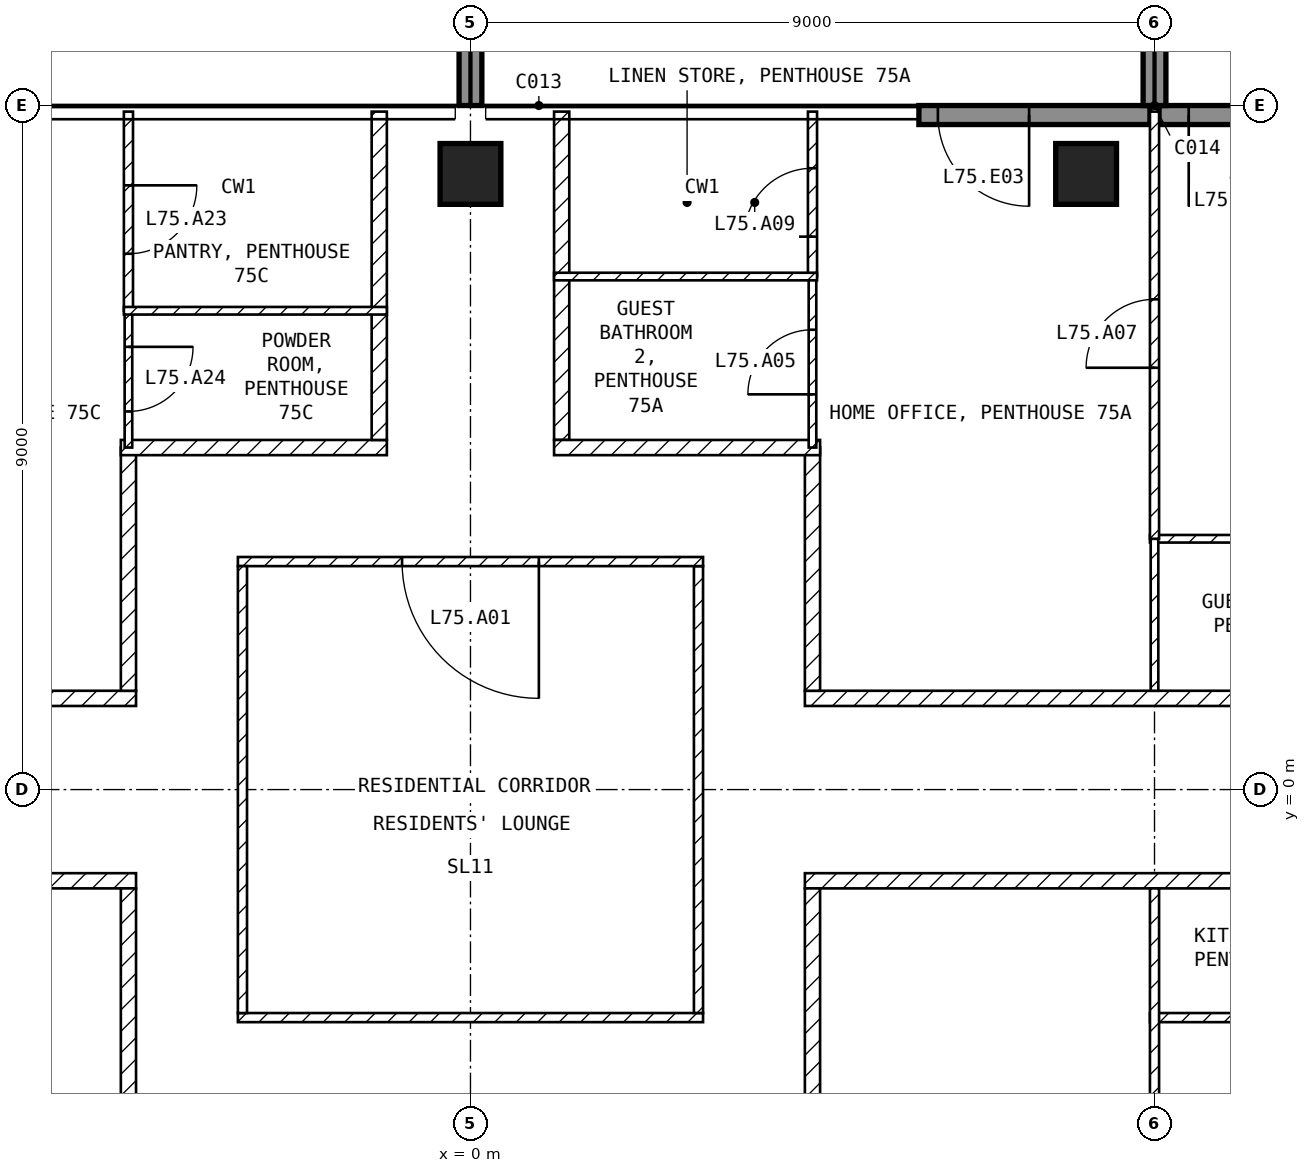
"""IFC4 building model, lengths in metres.
Left out: names, types, materials, properties, quantities, classifications, styles, units other than length and angle.
Written with IfcOpenShell. Run it as: python <this file> out.ifc"""

import sys

from ifc_helpers import new_model, si_unit, direction, frame, frame_2d, origin, origin_2d, place, context, subcontext, project, spatial, rectangle, extrude, element, fill, save


model = new_model("IFC4")
c1 = context("Model", 3, precision=1e-05, world=origin(), true_north=direction((0.0, 1.0)))
c2 = subcontext(c1, "Body", "Model", "MODEL_VIEW")
j1 = project(units=[si_unit("LENGTHUNIT", "METRE"), si_unit("PLANEANGLEUNIT", "RADIAN")], contexts=[c1])
p1 = place(None, origin())
s1 = spatial("IfcSite", under=j1, at=p1, CompositionType="ELEMENT")
p2 = place(p1, origin())
s2 = spatial("IfcBuilding", under=s1, at=p2, CompositionType="ELEMENT")
p3 = place(p2, frame((0.0, 0.0, 294.6)))
s3 = spatial("IfcBuildingStorey", under=s2, at=p3, CompositionType="ELEMENT", Elevation=294.6)
for number, where, z_axis, x_axis in (
    (1, (0.0, 8.1, -0.25), (0.0, 0.0, 1.0), (1.0, 0.0, 0.0)),
    (2, (8.1, 8.1, -0.25), (0.0, 0.0, 1.0), (1.0, 0.0, 0.0)),
):
    element("IfcColumn", number, at=place(p3, frame(where, z_axis=z_axis, x_axis=x_axis)), inside=s3, PredefinedType="COLUMN", context=c2, shape_type="SweptSolid", body=[
        extrude(rectangle(XDim=0.8, YDim=0.8, at=origin_2d()), origin(), (0.0, 0.0, 1.0), 4.2),
    ])
p4 = place(p3, frame((10.9, 8.875, 0.0), z_axis=(0.0, 0.0, 1.0), x_axis=(-1.0, 0.0, 0.0)))
e3 = element("IfcWall", 3, at=p4, inside=s3, PredefinedType="SOLIDWALL", context=c2, shape_type="SweptSolid", body=[
    extrude(rectangle(XDim=1.84, YDim=0.25, at=frame_2d((0.92, 0.0))), origin(), (0.0, 0.0, 1.0), 3.95),
])
p5 = place(p4, frame((0.25, 0.0, 0.0)))
e4 = element("IfcOpeningElement", 4, at=p5, cuts=e3, PredefinedType="OPENING", context=c2, shape_type="SweptSolid", body=[
    extrude(rectangle(XDim=1.2, YDim=2.4, at=frame_2d((0.6, 1.2))), frame((0.0, 0.135, 0.0), z_axis=(0.0, -1.0, 0.0), x_axis=(1.0, 0.0, 0.0)), (0.0, 0.0, 1.0), 0.27),
])
p6 = place(p3, frame((8.94, 8.875, 0.0), z_axis=(0.0, 0.0, 1.0), x_axis=(-1.0, 0.0, 0.0)))
e5 = element("IfcWall", 5, at=p6, inside=s3, PredefinedType="SOLIDWALL", context=c2, shape_type="SweptSolid", body=[
    extrude(rectangle(XDim=3.04, YDim=0.25, at=frame_2d((1.52, 0.0))), origin(), (0.0, 0.0, 1.0), 3.95),
])
p7 = place(p6, frame((1.59, 0.0, 0.0)))
e6 = element("IfcOpeningElement", 6, at=p7, cuts=e5, PredefinedType="OPENING", context=c2, shape_type="SweptSolid", body=[
    extrude(rectangle(XDim=1.2, YDim=2.4, at=frame_2d((0.6, 1.2))), frame((0.0, 0.135, 0.0), z_axis=(0.0, -1.0, 0.0), x_axis=(1.0, 0.0, 0.0)), (0.0, 0.0, 1.0), 0.27),
])
for number, where, z_axis, x_axis in (
    (7, (0.0, 9.0, 0.0), (0.0, 0.0, 1.0), (0.0, 1.0, 0.0)),
    (8, (9.0, 9.0, 0.0), (0.0, 0.0, 1.0), (0.0, 1.0, 0.0)),
):
    element("IfcWall", number, at=place(p3, frame(where, z_axis=z_axis, x_axis=x_axis)), inside=s3, PredefinedType="SOLIDWALL", context=c2, shape_type="SweptSolid", body=[
        extrude(rectangle(XDim=2.7, YDim=0.3, at=frame_2d((1.35, 0.0))), origin(), (0.0, 0.0, 1.0), 3.95),
    ])
p8 = place(p3, frame((-3.06, -3.0, 0.0), z_axis=(0.0, 0.0, 1.0), x_axis=(1.0, 0.0, 0.0)))
e9 = element("IfcWall", 9, at=p8, inside=s3, PredefinedType="PARTITIONING", context=c2, shape_type="SweptSolid", body=[
    extrude(rectangle(XDim=6.12, YDim=0.12, at=frame_2d((3.06, 0.0))), origin(), (0.0, 0.0, 1.0), 3.95),
])
p9 = place(p3, frame((3.0, -2.94, 0.0), z_axis=(0.0, 0.0, 1.0), x_axis=(0.0, 1.0, 0.0)))
e10 = element("IfcWall", 10, at=p9, inside=s3, PredefinedType="PARTITIONING", context=c2, shape_type="SweptSolid", body=[
    extrude(rectangle(XDim=5.88, YDim=0.12, at=frame_2d((2.94, 0.0))), origin(), (0.0, 0.0, 1.0), 3.95),
])
p10 = place(p3, frame((3.06, 3.0, 0.0), z_axis=(0.0, 0.0, 1.0), x_axis=(-1.0, 0.0, 0.0)))
e11 = element("IfcWall", 11, at=p10, inside=s3, PredefinedType="PARTITIONING", context=c2, shape_type="SweptSolid", body=[
    extrude(rectangle(XDim=6.12, YDim=0.12, at=frame_2d((3.06, 0.0))), origin(), (0.0, 0.0, 1.0), 3.95),
])
p11 = place(p10, frame((2.16, 0.0, 0.0)))
e12 = element("IfcOpeningElement", 12, at=p11, cuts=e11, PredefinedType="OPENING", context=c2, shape_type="SweptSolid", body=[
    extrude(rectangle(XDim=1.8, YDim=2.1, at=frame_2d((0.9, 1.05))), frame((0.0, 0.07, 0.0), z_axis=(0.0, -1.0, 0.0), x_axis=(1.0, 0.0, 0.0)), (0.0, 0.0, 1.0), 0.14),
])
p12 = place(p3, frame((-3.0, 2.94, 0.0), z_axis=(0.0, 0.0, 1.0), x_axis=(0.0, -1.0, 0.0)))
e13 = element("IfcWall", 13, at=p12, inside=s3, PredefinedType="PARTITIONING", context=c2, shape_type="SweptSolid", body=[
    extrude(rectangle(XDim=5.88, YDim=0.12, at=frame_2d((2.94, 0.0))), origin(), (0.0, 0.0, 1.0), 3.95),
])
p13 = place(p3, frame((4.4, 1.2, 0.0), z_axis=(0.0, 0.0, 1.0), x_axis=(1.0, 0.0, 0.0)))
e14 = element("IfcWall", 14, at=p13, inside=s3, PredefinedType="PARTITIONING", context=c2, shape_type="SweptSolid", body=[
    extrude(rectangle(XDim=17.2, YDim=0.2, at=frame_2d((8.6, 0.0))), origin(), (0.0, 0.0, 1.0), 3.95),
])
p14 = place(p13, frame((14.9, 0.0, 0.0)))
e15 = element("IfcOpeningElement", 15, at=p14, cuts=e14, PredefinedType="OPENING", context=c2, shape_type="SweptSolid", body=[
    extrude(rectangle(XDim=1.0, YDim=2.1, at=frame_2d((0.5, 1.05))), frame((0.0, 0.11, 0.0), z_axis=(0.0, -1.0, 0.0), x_axis=(1.0, 0.0, 0.0)), (0.0, 0.0, 1.0), 0.22),
])
p15 = place(p3, frame((4.5, 4.5, 0.0), z_axis=(0.0, 0.0, 1.0), x_axis=(0.0, -1.0, 0.0)))
e16 = element("IfcWall", 16, at=p15, inside=s3, PredefinedType="PARTITIONING", context=c2, shape_type="SweptSolid", body=[
    extrude(rectangle(XDim=3.2, YDim=0.2, at=frame_2d((1.6, 0.0))), origin(), (0.0, 0.0, 1.0), 3.95),
])
p16 = place(p3, frame((1.2, 8.92, 0.0), z_axis=(0.0, 0.0, 1.0), x_axis=(0.0, -1.0, 0.0)))
e17 = element("IfcWall", 17, at=p16, inside=s3, PredefinedType="PARTITIONING", context=c2, shape_type="SweptSolid", body=[
    extrude(rectangle(XDim=4.32, YDim=0.2, at=frame_2d((2.16, 0.0))), origin(), (0.0, 0.0, 1.0), 3.95),
])
p17 = place(p3, frame((1.1, 4.5, 0.0), z_axis=(0.0, 0.0, 1.0), x_axis=(1.0, 0.0, 0.0)))
e18 = element("IfcWall", 18, at=p17, inside=s3, PredefinedType="PARTITIONING", context=c2, shape_type="SweptSolid", body=[
    extrude(rectangle(XDim=3.5, YDim=0.2, at=frame_2d((1.75, 0.0))), origin(), (0.0, 0.0, 1.0), 3.95),
])
p18 = place(p3, frame((21.6, -1.2, 0.0), z_axis=(0.0, 0.0, 1.0), x_axis=(-1.0, 0.0, 0.0)))
e19 = element("IfcWall", 19, at=p18, inside=s3, PredefinedType="PARTITIONING", context=c2, shape_type="SweptSolid", body=[
    extrude(rectangle(XDim=17.2, YDim=0.2, at=frame_2d((8.6, 0.0))), origin(), (0.0, 0.0, 1.0), 3.95),
])
p19 = place(p18, frame((7.9, 0.0, 0.0)))
e20 = element("IfcOpeningElement", 20, at=p19, cuts=e19, PredefinedType="OPENING", context=c2, shape_type="SweptSolid", body=[
    extrude(rectangle(XDim=1.0, YDim=2.1, at=frame_2d((0.5, 1.05))), frame((0.0, 0.11, 0.0), z_axis=(0.0, -1.0, 0.0), x_axis=(1.0, 0.0, 0.0)), (0.0, 0.0, 1.0), 0.22),
])
p20 = place(p3, frame((4.5, -1.3, 0.0), z_axis=(0.0, 0.0, 1.0), x_axis=(0.0, -1.0, 0.0)))
e21 = element("IfcWall", 21, at=p20, inside=s3, PredefinedType="PARTITIONING", context=c2, shape_type="SweptSolid", body=[
    extrude(rectangle(XDim=3.2, YDim=0.2, at=frame_2d((1.6, 0.0))), origin(), (0.0, 0.0, 1.0), 3.95),
])
p21 = place(p3, frame((-21.6, 1.2, 0.0), z_axis=(0.0, 0.0, 1.0), x_axis=(1.0, 0.0, 0.0)))
e22 = element("IfcWall", 22, at=p21, inside=s3, PredefinedType="PARTITIONING", context=c2, shape_type="SweptSolid", body=[
    extrude(rectangle(XDim=17.2, YDim=0.2, at=frame_2d((8.6, 0.0))), origin(), (0.0, 0.0, 1.0), 3.95),
])
p22 = place(p21, frame((6.1, 0.0, 0.0)))
e23 = element("IfcOpeningElement", 23, at=p22, cuts=e22, PredefinedType="OPENING", context=c2, shape_type="SweptSolid", body=[
    extrude(rectangle(XDim=1.0, YDim=2.1, at=frame_2d((0.5, 1.05))), frame((0.0, 0.11, 0.0), z_axis=(0.0, -1.0, 0.0), x_axis=(1.0, 0.0, 0.0)), (0.0, 0.0, 1.0), 0.22),
])
p23 = place(p3, frame((-4.5, 1.3, 0.0), z_axis=(0.0, 0.0, 1.0), x_axis=(0.0, 1.0, 0.0)))
e24 = element("IfcWall", 24, at=p23, inside=s3, PredefinedType="PARTITIONING", context=c2, shape_type="SweptSolid", body=[
    extrude(rectangle(XDim=3.2, YDim=0.2, at=frame_2d((1.6, 0.0))), origin(), (0.0, 0.0, 1.0), 3.95),
])
p24 = place(p3, frame((-4.6, 4.5, 0.0), z_axis=(0.0, 0.0, 1.0), x_axis=(1.0, 0.0, 0.0)))
e25 = element("IfcWall", 25, at=p24, inside=s3, PredefinedType="PARTITIONING", context=c2, shape_type="SweptSolid", body=[
    extrude(rectangle(XDim=3.5, YDim=0.2, at=frame_2d((1.75, 0.0))), origin(), (0.0, 0.0, 1.0), 3.95),
])
p25 = place(p3, frame((-1.2, 4.6, 0.0), z_axis=(0.0, 0.0, 1.0), x_axis=(0.0, 1.0, 0.0)))
e26 = element("IfcWall", 26, at=p25, inside=s3, PredefinedType="PARTITIONING", context=c2, shape_type="SweptSolid", body=[
    extrude(rectangle(XDim=4.32, YDim=0.2, at=frame_2d((2.16, 0.0))), origin(), (0.0, 0.0, 1.0), 3.95),
])
p26 = place(p3, frame((-4.4, -1.2, 0.0), z_axis=(0.0, 0.0, 1.0), x_axis=(-1.0, 0.0, 0.0)))
e27 = element("IfcWall", 27, at=p26, inside=s3, PredefinedType="PARTITIONING", context=c2, shape_type="SweptSolid", body=[
    extrude(rectangle(XDim=17.2, YDim=0.2, at=frame_2d((8.6, 0.0))), origin(), (0.0, 0.0, 1.0), 3.95),
])
p27 = place(p26, frame((8.3, 0.0, 0.0)))
e28 = element("IfcOpeningElement", 28, at=p27, cuts=e27, PredefinedType="OPENING", context=c2, shape_type="SweptSolid", body=[
    extrude(rectangle(XDim=1.0, YDim=2.1, at=frame_2d((0.5, 1.05))), frame((0.0, 0.11, 0.0), z_axis=(0.0, -1.0, 0.0), x_axis=(1.0, 0.0, 0.0)), (0.0, 0.0, 1.0), 0.22),
])
p28 = place(p3, frame((-4.5, -4.5, 0.0), z_axis=(0.0, 0.0, 1.0), x_axis=(0.0, 1.0, 0.0)))
e29 = element("IfcWall", 29, at=p28, inside=s3, PredefinedType="PARTITIONING", context=c2, shape_type="SweptSolid", body=[
    extrude(rectangle(XDim=3.2, YDim=0.2, at=frame_2d((1.6, 0.0))), origin(), (0.0, 0.0, 1.0), 3.95),
])
p29 = place(p3, frame((8.94, 3.3, 0.0), z_axis=(0.0, 0.0, 1.0), x_axis=(1.0, 0.0, 0.0)))
e30 = element("IfcWall", 30, at=p29, inside=s3, PredefinedType="PARTITIONING", context=c2, shape_type="SweptSolid", body=[
    extrude(rectangle(XDim=3.51, YDim=0.1, at=frame_2d((1.755, 0.0))), origin(), (0.0, 0.0, 1.0), 3.95),
])
p30 = place(p29, frame((1.36, 0.0, 0.0)))
e31 = element("IfcOpeningElement", 31, at=p30, cuts=e30, PredefinedType="OPENING", context=c2, shape_type="SweptSolid", body=[
    extrude(rectangle(XDim=0.85, YDim=2.1, at=frame_2d((0.425, 1.05))), frame((0.0, 0.06, 0.0), z_axis=(0.0, -1.0, 0.0), x_axis=(1.0, 0.0, 0.0)), (0.0, 0.0, 1.0), 0.12),
])
p31 = place(p3, frame((9.0, 1.3, 0.0), z_axis=(0.0, 0.0, 1.0), x_axis=(0.0, 1.0, 0.0)))
e32 = element("IfcWall", 32, at=p31, inside=s3, PredefinedType="PARTITIONING", context=c2, shape_type="SweptSolid", body=[
    extrude(rectangle(XDim=2.0, YDim=0.1, at=frame_2d((1.0, 0.0))), origin(), (0.0, 0.0, 1.0), 3.95),
])
p32 = place(p3, frame((9.0, 3.3, 0.0), z_axis=(0.0, 0.0, 1.0), x_axis=(0.0, 1.0, 0.0)))
e33 = element("IfcWall", 33, at=p32, inside=s3, PredefinedType="PARTITIONING", context=c2, shape_type="SweptSolid", body=[
    extrude(rectangle(XDim=5.62, YDim=0.12, at=frame_2d((2.81, 0.0))), origin(), (0.0, 0.0, 1.0), 3.95),
])
p33 = place(p32, frame((2.25, 0.0, 0.0)))
e34 = element("IfcOpeningElement", 34, at=p33, cuts=e33, PredefinedType="OPENING", context=c2, shape_type="SweptSolid", body=[
    extrude(rectangle(XDim=0.9, YDim=2.1, at=frame_2d((0.45, 1.05))), frame((0.0, 0.07, 0.0), z_axis=(0.0, -1.0, 0.0), x_axis=(1.0, 0.0, 0.0)), (0.0, 0.0, 1.0), 0.14),
])
p34 = place(p3, frame((4.5, 4.5, 0.0), z_axis=(0.0, 0.0, 1.0), x_axis=(0.0, 1.0, 0.0)))
e35 = element("IfcWall", 35, at=p34, inside=s3, PredefinedType="PARTITIONING", context=c2, shape_type="SweptSolid", body=[
    extrude(rectangle(XDim=2.25, YDim=0.1, at=frame_2d((1.125, 0.0))), origin(), (0.0, 0.0, 1.0), 3.95),
])
p35 = place(p34, frame((0.7, 0.0, 0.0)))
e36 = element("IfcOpeningElement", 36, at=p35, cuts=e35, PredefinedType="OPENING", context=c2, shape_type="SweptSolid", body=[
    extrude(rectangle(XDim=0.85, YDim=2.1, at=frame_2d((0.425, 1.05))), frame((0.0, 0.06, 0.0), z_axis=(0.0, -1.0, 0.0), x_axis=(1.0, 0.0, 0.0)), (0.0, 0.0, 1.0), 0.12),
])
p36 = place(p3, frame((4.5, 6.75, 0.0), z_axis=(0.0, 0.0, 1.0), x_axis=(0.0, 1.0, 0.0)))
e37 = element("IfcWall", 37, at=p36, inside=s3, PredefinedType="PARTITIONING", context=c2, shape_type="SweptSolid", body=[
    extrude(rectangle(XDim=2.17, YDim=0.12, at=frame_2d((1.085, 0.0))), origin(), (0.0, 0.0, 1.0), 3.95),
])
p37 = place(p36, frame((0.525, 0.0, 0.0)))
e38 = element("IfcOpeningElement", 38, at=p37, cuts=e37, PredefinedType="OPENING", context=c2, shape_type="SweptSolid", body=[
    extrude(rectangle(XDim=0.9, YDim=2.1, at=frame_2d((0.45, 1.05))), frame((0.0, 0.07, 0.0), z_axis=(0.0, -1.0, 0.0), x_axis=(1.0, 0.0, 0.0)), (0.0, 0.0, 1.0), 0.14),
])
p38 = place(p3, frame((1.1, 6.75, 0.0), z_axis=(0.0, 0.0, 1.0), x_axis=(1.0, 0.0, 0.0)))
e39 = element("IfcWall", 39, at=p38, inside=s3, PredefinedType="PARTITIONING", context=c2, shape_type="SweptSolid", body=[
    extrude(rectangle(XDim=3.46, YDim=0.1, at=frame_2d((1.73, 0.0))), origin(), (0.0, 0.0, 1.0), 3.95),
])
p39 = place(p3, frame((16.8, -3.0, 0.0), z_axis=(0.0, 0.0, 1.0), x_axis=(-1.0, 0.0, 0.0)))
e40 = element("IfcWall", 40, at=p39, inside=s3, PredefinedType="PARTITIONING", context=c2, shape_type="SweptSolid", body=[
    extrude(rectangle(XDim=7.86, YDim=0.12, at=frame_2d((3.93, 0.0))), origin(), (0.0, 0.0, 1.0), 3.95),
])
p40 = place(p39, frame((3.15, 0.0, 0.0)))
e41 = element("IfcOpeningElement", 41, at=p40, cuts=e40, PredefinedType="OPENING", context=c2, shape_type="SweptSolid", body=[
    extrude(rectangle(XDim=0.9, YDim=2.1, at=frame_2d((0.45, 1.05))), frame((0.0, 0.07, 0.0), z_axis=(0.0, -1.0, 0.0), x_axis=(1.0, 0.0, 0.0)), (0.0, 0.0, 1.0), 0.14),
])
p41 = place(p3, frame((9.0, -8.92, 0.0), z_axis=(0.0, 0.0, 1.0), x_axis=(0.0, 1.0, 0.0)))
e42 = element("IfcWall", 42, at=p41, inside=s3, PredefinedType="PARTITIONING", context=c2, shape_type="SweptSolid", body=[
    extrude(rectangle(XDim=7.62, YDim=0.12, at=frame_2d((3.81, 0.0))), origin(), (0.0, 0.0, 1.0), 3.95),
])
p42 = place(p41, frame((2.62, 0.0, 0.0)))
e43 = element("IfcOpeningElement", 43, at=p42, cuts=e42, PredefinedType="OPENING", context=c2, shape_type="SweptSolid", body=[
    extrude(rectangle(XDim=0.9, YDim=2.1, at=frame_2d((0.45, 1.05))), frame((0.0, 0.07, 0.0), z_axis=(0.0, -1.0, 0.0), x_axis=(1.0, 0.0, 0.0)), (0.0, 0.0, 1.0), 0.14),
])
p43 = place(p3, frame((-4.5, 6.3, 0.0), z_axis=(0.0, 0.0, 1.0), x_axis=(0.0, -1.0, 0.0)))
e44 = element("IfcWall", 44, at=p43, inside=s3, PredefinedType="PARTITIONING", context=c2, shape_type="SweptSolid", body=[
    extrude(rectangle(XDim=1.8, YDim=0.1, at=frame_2d((0.9, 0.0))), origin(), (0.0, 0.0, 1.0), 3.95),
])
p44 = place(p43, frame((0.475, 0.0, 0.0)))
e45 = element("IfcOpeningElement", 45, at=p44, cuts=e44, PredefinedType="OPENING", context=c2, shape_type="SweptSolid", body=[
    extrude(rectangle(XDim=0.85, YDim=2.1, at=frame_2d((0.425, 1.05))), frame((0.0, 0.06, 0.0), z_axis=(0.0, -1.0, 0.0), x_axis=(1.0, 0.0, 0.0)), (0.0, 0.0, 1.0), 0.12),
])
p45 = place(p3, frame((-4.5, 8.92, 0.0), z_axis=(0.0, 0.0, 1.0), x_axis=(0.0, -1.0, 0.0)))
e46 = element("IfcWall", 46, at=p45, inside=s3, PredefinedType="PARTITIONING", context=c2, shape_type="SweptSolid", body=[
    extrude(rectangle(XDim=2.62, YDim=0.12, at=frame_2d((1.31, 0.0))), origin(), (0.0, 0.0, 1.0), 3.95),
])
p46 = place(p45, frame((0.97, 0.0, 0.0)))
e47 = element("IfcOpeningElement", 47, at=p46, cuts=e46, PredefinedType="OPENING", context=c2, shape_type="SweptSolid", body=[
    extrude(rectangle(XDim=0.9, YDim=2.1, at=frame_2d((0.45, 1.05))), frame((0.0, 0.07, 0.0), z_axis=(0.0, -1.0, 0.0), x_axis=(1.0, 0.0, 0.0)), (0.0, 0.0, 1.0), 0.14),
])
p47 = place(p3, frame((-4.56, 6.3, 0.0), z_axis=(0.0, 0.0, 1.0), x_axis=(1.0, 0.0, 0.0)))
e48 = element("IfcWall", 48, at=p47, inside=s3, PredefinedType="PARTITIONING", context=c2, shape_type="SweptSolid", body=[
    extrude(rectangle(XDim=3.46, YDim=0.1, at=frame_2d((1.73, 0.0))), origin(), (0.0, 0.0, 1.0), 3.95),
])
p48 = place(p5, origin())
e49 = element("IfcDoor", 49, at=p48, inside=s3, OperationType="SINGLE_SWING_RIGHT", PredefinedType="DOOR", context=c2, shape_type="SweptSolid", body=[
    extrude(rectangle(XDim=1.2, YDim=2.4, at=frame_2d((0.6, 1.2))), frame((0.0, 0.025, 0.0), z_axis=(0.0, -1.0, 0.0), x_axis=(1.0, 0.0, 0.0)), (0.0, 0.0, 1.0), 0.05),
])
fill(e4, e49)
p49 = place(p7, origin())
e50 = element("IfcDoor", 50, at=p49, inside=s3, OperationType="SINGLE_SWING_LEFT", PredefinedType="DOOR", context=c2, shape_type="SweptSolid", body=[
    extrude(rectangle(XDim=1.2, YDim=2.4, at=frame_2d((0.6, 1.2))), frame((0.0, 0.025, 0.0), z_axis=(0.0, -1.0, 0.0), x_axis=(1.0, 0.0, 0.0)), (0.0, 0.0, 1.0), 0.05),
])
fill(e6, e50)
p50 = place(p11, origin())
e51 = element("IfcDoor", 51, at=p50, inside=s3, OperationType="SINGLE_SWING_LEFT", PredefinedType="DOOR", context=c2, shape_type="SweptSolid", body=[
    extrude(rectangle(XDim=1.8, YDim=2.1, at=frame_2d((0.9, 1.05))), frame((0.0, 0.025, 0.0), z_axis=(0.0, -1.0, 0.0), x_axis=(1.0, 0.0, 0.0)), (0.0, 0.0, 1.0), 0.05),
])
fill(e12, e51)
p51 = place(p35, origin())
e52 = element("IfcDoor", 52, at=p51, inside=s3, OperationType="SINGLE_SWING_LEFT", PredefinedType="DOOR", context=c2, shape_type="SweptSolid", body=[
    extrude(rectangle(XDim=0.85, YDim=2.1, at=frame_2d((0.425, 1.05))), frame((0.0, 0.025, 0.0), z_axis=(0.0, -1.0, 0.0), x_axis=(1.0, 0.0, 0.0)), (0.0, 0.0, 1.0), 0.05),
])
fill(e36, e52)
p52 = place(p33, origin())
e53 = element("IfcDoor", 53, at=p52, inside=s3, OperationType="SINGLE_SWING_LEFT", PredefinedType="DOOR", context=c2, shape_type="SweptSolid", body=[
    extrude(rectangle(XDim=0.9, YDim=2.1, at=frame_2d((0.45, 1.05))), frame((0.0, 0.025, 0.0), z_axis=(0.0, -1.0, 0.0), x_axis=(1.0, 0.0, 0.0)), (0.0, 0.0, 1.0), 0.05),
])
fill(e34, e53)
p53 = place(p37, origin())
e54 = element("IfcDoor", 54, at=p53, inside=s3, OperationType="SINGLE_SWING_LEFT", PredefinedType="DOOR", context=c2, shape_type="SweptSolid", body=[
    extrude(rectangle(XDim=0.9, YDim=2.1, at=frame_2d((0.45, 1.05))), frame((0.0, 0.025, 0.0), z_axis=(0.0, -1.0, 0.0), x_axis=(1.0, 0.0, 0.0)), (0.0, 0.0, 1.0), 0.05),
])
fill(e38, e54)
p54 = place(p46, origin())
e55 = element("IfcDoor", 55, at=p54, inside=s3, OperationType="SINGLE_SWING_LEFT", PredefinedType="DOOR", context=c2, shape_type="SweptSolid", body=[
    extrude(rectangle(XDim=0.9, YDim=2.1, at=frame_2d((0.45, 1.05))), frame((0.0, 0.025, 0.0), z_axis=(0.0, -1.0, 0.0), x_axis=(1.0, 0.0, 0.0)), (0.0, 0.0, 1.0), 0.05),
])
fill(e47, e55)
p55 = place(p44, origin())
e56 = element("IfcDoor", 56, at=p55, inside=s3, OperationType="SINGLE_SWING_LEFT", PredefinedType="DOOR", context=c2, shape_type="SweptSolid", body=[
    extrude(rectangle(XDim=0.85, YDim=2.1, at=frame_2d((0.425, 1.05))), frame((0.0, 0.025, 0.0), z_axis=(0.0, -1.0, 0.0), x_axis=(1.0, 0.0, 0.0)), (0.0, 0.0, 1.0), 0.05),
])
fill(e45, e56)
save(model, sys.argv[1])
